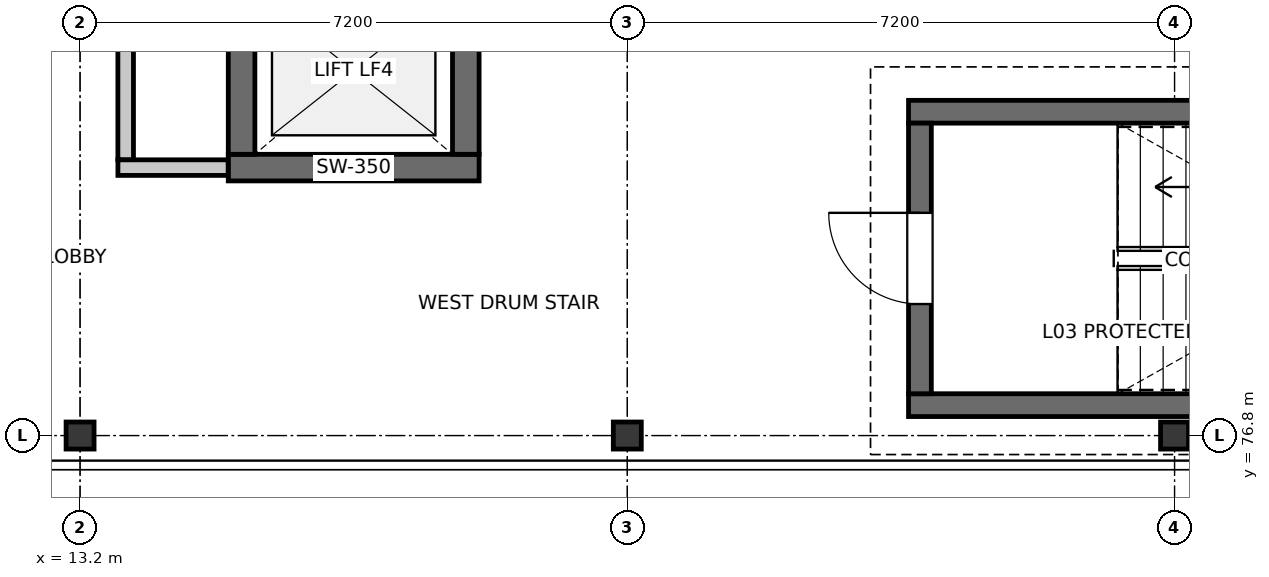
"""IFC4 building model, lengths in metres.
Left out: names, types, materials, properties, quantities, classifications, styles, units other than length and angle.
Written with IfcOpenShell. Run it as: python <this file> out.ifc"""

import sys

from ifc_helpers import new_model, si_unit, direction, frame, frame_2d, origin, origin_2d, place, context, subcontext, project, spatial, rectangle, i_section, extrude, element, fill, save


model = new_model("IFC4")
c1 = context("Model", 3, precision=1e-05, world=origin(), true_north=direction((0.0, 1.0)))
c2 = subcontext(c1, "Body", "Model", "MODEL_VIEW")
j1 = project(units=[si_unit("LENGTHUNIT", "METRE"), si_unit("PLANEANGLEUNIT", "RADIAN")], contexts=[c1])
p1 = place(None, origin())
s1 = spatial("IfcSite", under=j1, at=p1, CompositionType="ELEMENT")
p2 = place(p1, origin())
s2 = spatial("IfcBuilding", under=s1, at=p2, CompositionType="ELEMENT")
p3 = place(p2, frame((0.0, 0.0, 13.2)))
s3 = spatial("IfcBuildingStorey", under=s2, at=p3, CompositionType="ELEMENT", Elevation=13.2)
for number, where, z_axis, x_axis in (
    (1, (13.2, 76.8, 0.0), (0.0, 0.0, 1.0), (1.0, 0.0, 0.0)),
    (2, (20.4, 76.8, 0.0), (0.0, 0.0, 1.0), (1.0, 0.0, 0.0)),
    (3, (27.6, 76.8, 0.0), (0.0, 0.0, 1.0), (1.0, 0.0, 0.0)),
):
    element("IfcColumn", number, at=place(p3, frame(where, z_axis=z_axis, x_axis=x_axis)), inside=s3, PredefinedType="COLUMN", context=c2, shape_type="SweptSolid", body=[
        extrude(i_section(OverallWidth=0.368, OverallDepth=0.356, WebThickness=0.011, FlangeThickness=0.018, FilletRadius=0.015, at=origin_2d()), origin(), (0.0, 0.0, 1.0), 3.9),
    ])
for number, where, z_axis, x_axis in (
    (4, (33.5, 77.2, 0.0), (0.0, 0.0, 1.0), (-1.0, 0.0, 0.0)),
    (5, (24.1, 81.06, 0.0), (0.0, 0.0, 1.0), (1.0, 0.0, 0.0)),
):
    element("IfcWall", number, at=place(p3, frame(where, z_axis=z_axis, x_axis=x_axis)), inside=s3, PredefinedType="SOLIDWALL", context=c2, shape_type="SweptSolid", body=[
        extrude(rectangle(XDim=9.4, YDim=0.3, at=frame_2d((4.7, 0.0))), origin(), (0.0, 0.0, 1.0), 3.65),
    ])
p4 = place(p3, frame((24.25, 77.35, 0.0), z_axis=(0.0, 0.0, 1.0), x_axis=(0.0, 1.0, 0.0)))
e6 = element("IfcWall", 6, at=p4, inside=s3, PredefinedType="SOLIDWALL", context=c2, shape_type="SweptSolid", body=[
    extrude(rectangle(XDim=3.56, YDim=0.3, at=frame_2d((1.78, 0.0))), origin(), (0.0, 0.0, 1.0), 3.65),
])
p5 = place(p4, frame((1.18, 0.0, 0.0)))
e7 = element("IfcOpeningElement", 7, at=p5, cuts=e6, PredefinedType="OPENING", context=c2, shape_type="SweptSolid", body=[
    extrude(rectangle(XDim=1.2, YDim=2.2, at=frame_2d((0.6, 1.1))), frame((0.0, 0.16, 0.0), z_axis=(0.0, -1.0, 0.0), x_axis=(1.0, 0.0, 0.0)), (0.0, 0.0, 1.0), 0.32),
])
p6 = place(p3, frame((18.45, 80.325, 0.0), z_axis=(0.0, 0.0, 1.0), x_axis=(-1.0, 0.0, 0.0)))
e8 = element("IfcWall", 8, at=p6, inside=s3, PredefinedType="SHEAR", context=c2, shape_type="SweptSolid", body=[
    extrude(rectangle(XDim=3.3, YDim=0.35, at=frame_2d((1.65, 0.0))), origin(), (0.0, 0.0, 1.0), 3.65),
])
for number, where, z_axis, x_axis in (
    (9, (15.325, 80.5, 0.0), (0.0, 0.0, 1.0), (0.0, 1.0, 0.0)),
    (10, (18.275, 82.7, 0.0), (0.0, 0.0, 1.0), (0.0, -1.0, 0.0)),
):
    element("IfcWall", number, at=place(p3, frame(where, z_axis=z_axis, x_axis=x_axis)), inside=s3, PredefinedType="SHEAR", context=c2, shape_type="SweptSolid", body=[
        extrude(rectangle(XDim=2.2, YDim=0.35, at=frame_2d((1.1, 0.0))), origin(), (0.0, 0.0, 1.0), 3.65),
    ])
p7 = place(p3, frame((15.148, 80.325, 0.0), z_axis=(0.0, 0.0, 1.0), x_axis=(-1.0, 0.0, 0.0)))
e11 = element("IfcWall", 11, at=p7, inside=s3, PredefinedType="PARTITIONING", context=c2, shape_type="SweptSolid", body=[
    extrude(rectangle(XDim=1.45, YDim=0.205, at=frame_2d((0.725, 0.0))), origin(), (0.0, 0.0, 1.0), 3.018),
])
p8 = place(p3, frame((13.8, 80.43, 0.0), z_axis=(0.0, 0.0, 1.0), x_axis=(0.0, 1.0, 0.0)))
e12 = element("IfcWall", 12, at=p8, inside=s3, PredefinedType="PARTITIONING", context=c2, shape_type="SweptSolid", body=[
    extrude(rectangle(XDim=4.516, YDim=0.205, at=frame_2d((2.258, 0.0))), origin(), (0.0, 0.0, 1.0), 3.018),
])
p9 = place(p8, frame((1.788, 0.0, 0.0)))
e13 = element("IfcOpeningElement", 13, at=p9, cuts=e12, PredefinedType="OPENING", context=c2, shape_type="SweptSolid", body=[
    extrude(rectangle(XDim=0.94, YDim=2.1, at=frame_2d((0.47, 1.05))), frame((0.0, 0.113, 0.0), z_axis=(0.0, -1.0, 0.0), x_axis=(1.0, 0.0, 0.0)), (0.0, 0.0, 1.0), 0.225),
])
p10 = place(p5, origin())
e14 = element("IfcDoor", 14, at=p10, inside=s3, OperationType="SINGLE_SWING_RIGHT", PredefinedType="DOOR", context=c2, shape_type="SweptSolid", body=[
    extrude(rectangle(XDim=1.2, YDim=2.2, at=frame_2d((0.6, 1.1))), frame((0.0, 0.025, 0.0), z_axis=(0.0, -1.0, 0.0), x_axis=(1.0, 0.0, 0.0)), (0.0, 0.0, 1.0), 0.05),
])
fill(e7, e14)
save(model, sys.argv[1])
